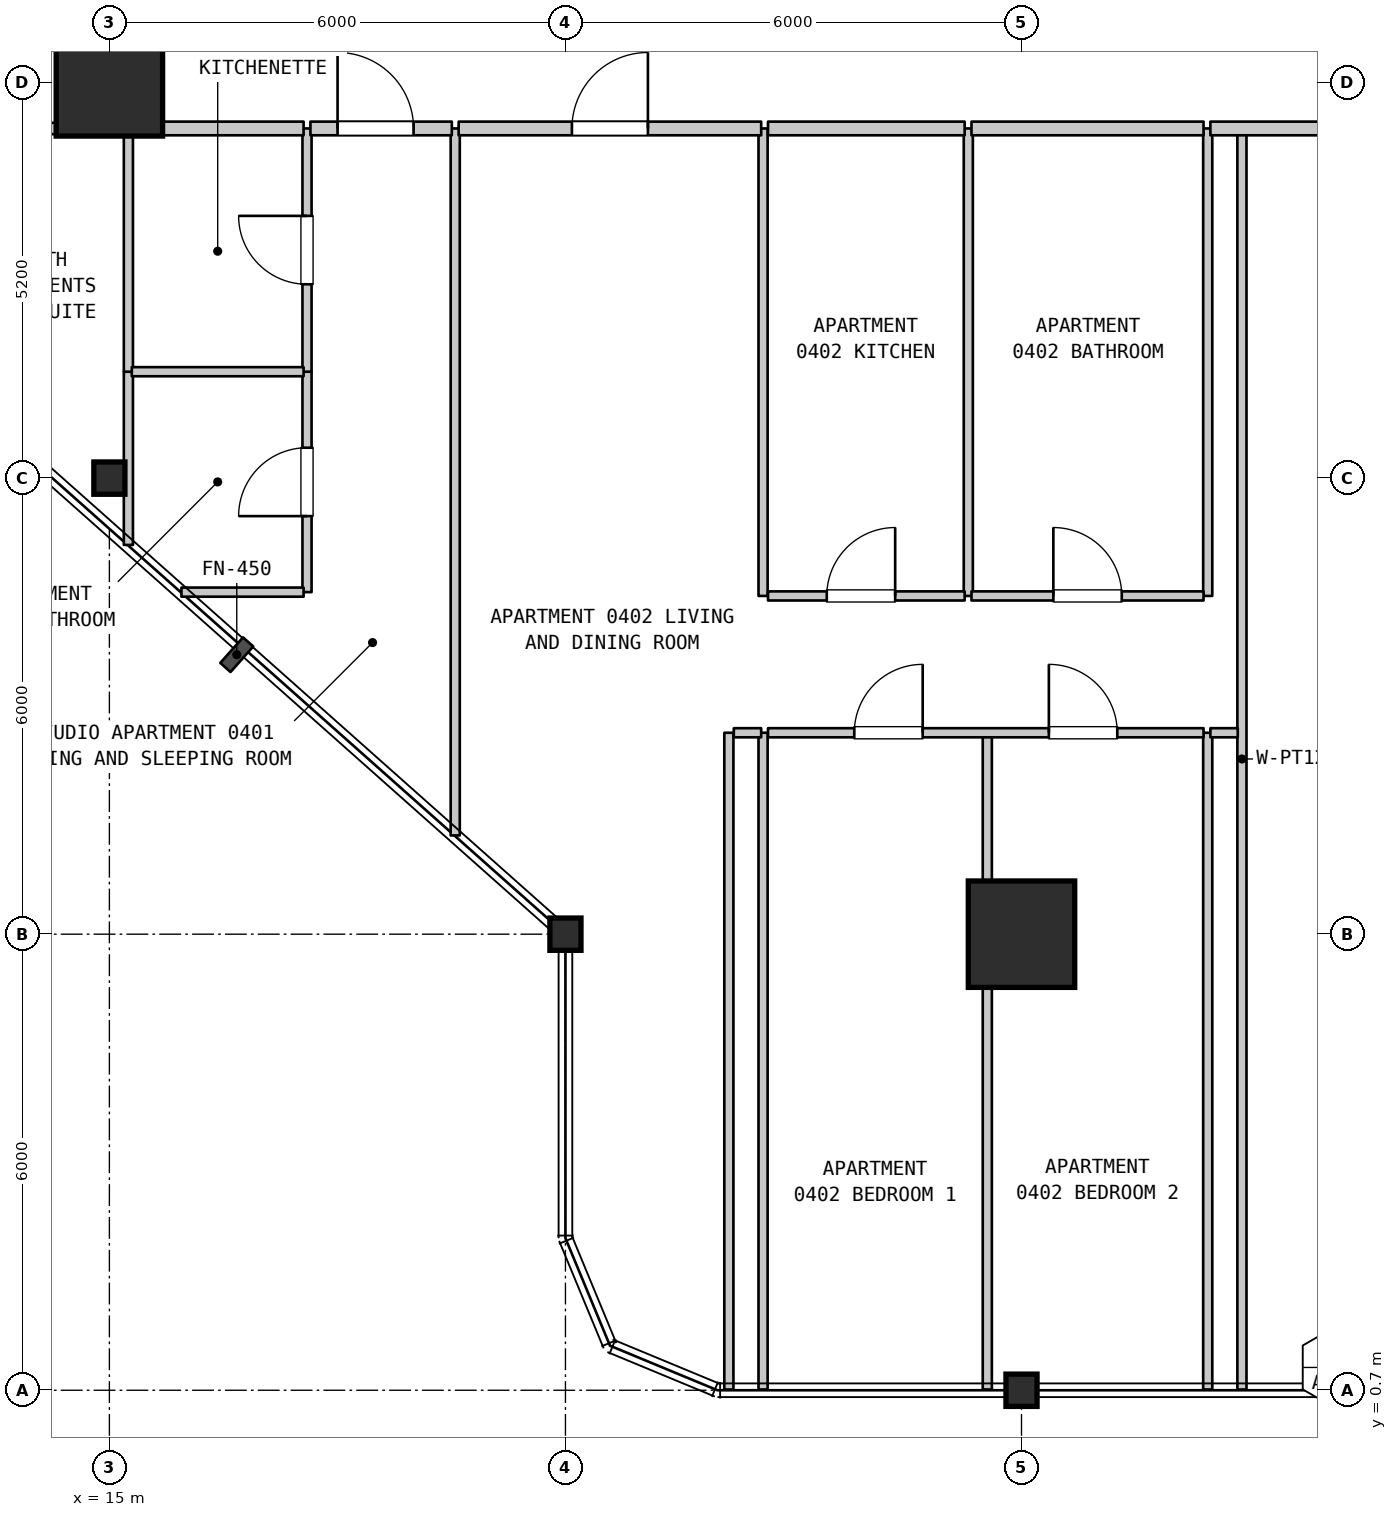
"""IFC4 building model, lengths in metres.
Left out: names, types, materials, properties, quantities, classifications, styles, units other than length and angle.
Written with IfcOpenShell. Run it as: python <this file> out.ifc"""

import sys

from ifc_helpers import new_model, si_unit, direction, frame, frame_2d, origin, origin_2d, place, context, subcontext, project, spatial, rectangle, i_section, extrude, element, fill, save


model = new_model("IFC4")
c1 = context("Model", 3, precision=1e-05, world=origin(), true_north=direction((0.0, 1.0)))
c2 = subcontext(c1, "Body", "Model", "MODEL_VIEW")
j1 = project(units=[si_unit("LENGTHUNIT", "METRE"), si_unit("PLANEANGLEUNIT", "RADIAN")], contexts=[c1])
p1 = place(None, origin())
s1 = spatial("IfcSite", under=j1, at=p1, CompositionType="ELEMENT")
p2 = place(p1, origin())
s2 = spatial("IfcBuilding", under=s1, at=p2, CompositionType="ELEMENT")
p3 = place(p2, frame((0.0, 0.0, 24.0)))
s3 = spatial("IfcBuildingStorey", under=s2, at=p3, CompositionType="ELEMENT", Elevation=24.0)
p4 = place(p3, frame((15.0, 12.7, 0.0), z_axis=(0.0, 0.0, 1.0), x_axis=(1.0, 0.0, 0.0)))
e1 = element("IfcColumn", 1, at=p4, inside=s3, PredefinedType="COLUMN", context=c2, shape_type="SweptSolid", body=[
    extrude(i_section(OverallWidth=0.409, OverallDepth=0.425, WebThickness=0.032, FlangeThickness=0.052, FilletRadius=0.015, at=origin_2d()), origin(), (0.0, 0.0, 1.0), 3.7),
])
p5 = place(p3, frame((15.0, 17.9, 0.0), z_axis=(0.0, 0.0, 1.0), x_axis=(1.0, 0.0, 0.0)))
e2 = element("IfcColumn", 2, at=p5, inside=s3, PredefinedType="COLUMN", context=c2, shape_type="SweptSolid", body=[
    extrude(rectangle(XDim=1.4, YDim=1.4, at=origin_2d()), origin(), (0.0, 0.0, 1.0), 3.7),
])
for number, where, z_axis, x_axis in (
    (3, (21.0, 6.7, 0.0), (0.0, 0.0, 1.0), (1.0, 0.0, 0.0)),
    (4, (27.0, 0.7, 0.0), (0.0, 0.0, 1.0), (1.0, 0.0, 0.0)),
):
    element("IfcColumn", number, at=place(p3, frame(where, z_axis=z_axis, x_axis=x_axis)), inside=s3, PredefinedType="COLUMN", context=c2, shape_type="SweptSolid", body=[
        extrude(i_section(OverallWidth=0.409, OverallDepth=0.425, WebThickness=0.032, FlangeThickness=0.052, FilletRadius=0.015, at=origin_2d()), origin(), (0.0, 0.0, 1.0), 3.7),
    ])
p6 = place(p3, frame((27.0, 6.7, 0.0), z_axis=(0.0, 0.0, 1.0), x_axis=(1.0, 0.0, 0.0)))
e5 = element("IfcColumn", 5, at=p6, inside=s3, PredefinedType="COLUMN", context=c2, shape_type="SweptSolid", body=[
    extrude(rectangle(XDim=1.4, YDim=1.4, at=origin_2d()), origin(), (0.0, 0.0, 1.0), 3.7),
])
p7 = place(p3, frame((15.25, 11.821, 0.0), z_axis=(0.0, 0.0, 1.0), x_axis=(0.0, 1.0, 0.0)))
e6 = element("IfcWall", 6, at=p7, inside=s3, PredefinedType="PARTITIONING", context=c2, shape_type="SweptSolid", body=[
    extrude(rectangle(XDim=2.279, YDim=0.12, at=frame_2d((1.14, 0.0))), origin(), (0.0, 0.0, 1.0), 3.385),
])
p8 = place(p3, frame((15.25, 14.1, 0.0), z_axis=(0.0, 0.0, 1.0), x_axis=(0.0, 1.0, 0.0)))
e7 = element("IfcWall", 7, at=p8, inside=s3, PredefinedType="PARTITIONING", context=c2, shape_type="SweptSolid", body=[
    extrude(rectangle(XDim=3.2, YDim=0.12, at=frame_2d((1.6, 0.0))), origin(), (0.0, 0.0, 1.0), 3.385),
])
p9 = place(p3, frame((17.6, 11.2, 0.0), z_axis=(0.0, 0.0, 1.0), x_axis=(0.0, 1.0, 0.0)))
e8 = element("IfcWall", 8, at=p9, inside=s3, PredefinedType="PARTITIONING", context=c2, shape_type="SweptSolid", body=[
    extrude(rectangle(XDim=2.9, YDim=0.12, at=frame_2d((1.45, 0.0))), origin(), (0.0, 0.0, 1.0), 3.385),
])
p10 = place(p9, frame((1.0, 0.0, 0.0)))
e9 = element("IfcOpeningElement", 9, at=p10, cuts=e8, PredefinedType="OPENING", context=c2, shape_type="SweptSolid", body=[
    extrude(rectangle(XDim=0.9, YDim=2.1, at=frame_2d((0.45, 1.05))), frame((0.0, 0.07, 0.0), z_axis=(0.0, -1.0, 0.0), x_axis=(1.0, 0.0, 0.0)), (0.0, 0.0, 1.0), 0.14),
])
p11 = place(p3, frame((17.6, 14.1, 0.0), z_axis=(0.0, 0.0, 1.0), x_axis=(0.0, 1.0, 0.0)))
e10 = element("IfcWall", 10, at=p11, inside=s3, PredefinedType="PARTITIONING", context=c2, shape_type="SweptSolid", body=[
    extrude(rectangle(XDim=3.2, YDim=0.12, at=frame_2d((1.6, 0.0))), origin(), (0.0, 0.0, 1.0), 3.385),
])
p12 = place(p11, frame((1.15, 0.0, 0.0)))
e11 = element("IfcOpeningElement", 11, at=p12, cuts=e10, PredefinedType="OPENING", context=c2, shape_type="SweptSolid", body=[
    extrude(rectangle(XDim=0.9, YDim=2.15, at=frame_2d((0.45, 1.075))), frame((0.0, 0.07, 0.0), z_axis=(0.0, -1.0, 0.0), x_axis=(1.0, 0.0, 0.0)), (0.0, 0.0, 1.0), 0.14),
])
p13 = place(p3, frame((19.55, 7.999, 0.0), z_axis=(0.0, 0.0, 1.0), x_axis=(0.0, 1.0, 0.0)))
e12 = element("IfcWall", 12, at=p13, inside=s3, PredefinedType="PARTITIONING", context=c2, shape_type="SweptSolid", body=[
    extrude(rectangle(XDim=9.301, YDim=0.12, at=frame_2d((4.65, 0.0))), origin(), (0.0, 0.0, 1.0), 3.385),
])
for number, where, z_axis, x_axis in (
    (13, (23.15, 0.71, 0.0), (0.0, 0.0, 1.0), (0.0, 1.0, 0.0)),
    (14, (23.6, 0.71, 0.0), (0.0, 0.0, 1.0), (0.0, 1.0, 0.0)),
):
    element("IfcWall", number, at=place(p3, frame(where, z_axis=z_axis, x_axis=x_axis)), inside=s3, PredefinedType="PARTITIONING", context=c2, shape_type="SweptSolid", body=[
        extrude(rectangle(XDim=8.64, YDim=0.12, at=frame_2d((4.32, 0.0))), origin(), (0.0, 0.0, 1.0), 3.385),
    ])
for number, where, z_axis, x_axis in (
    (15, (23.6, 11.15, 0.0), (0.0, 0.0, 1.0), (0.0, 1.0, 0.0)),
    (16, (26.3, 11.15, 0.0), (0.0, 0.0, 1.0), (0.0, 1.0, 0.0)),
):
    element("IfcWall", number, at=place(p3, frame(where, z_axis=z_axis, x_axis=x_axis)), inside=s3, PredefinedType="PARTITIONING", context=c2, shape_type="SweptSolid", body=[
        extrude(rectangle(XDim=6.15, YDim=0.12, at=frame_2d((3.075, 0.0))), origin(), (0.0, 0.0, 1.0), 3.385),
    ])
for number, where, z_axis, x_axis in (
    (17, (26.55, 0.71, 0.0), (0.0, 0.0, 1.0), (0.0, 1.0, 0.0)),
    (18, (29.45, 0.71, 0.0), (0.0, 0.0, 1.0), (0.0, 1.0, 0.0)),
):
    element("IfcWall", number, at=place(p3, frame(where, z_axis=z_axis, x_axis=x_axis)), inside=s3, PredefinedType="PARTITIONING", context=c2, shape_type="SweptSolid", body=[
        extrude(rectangle(XDim=8.64, YDim=0.12, at=frame_2d((4.32, 0.0))), origin(), (0.0, 0.0, 1.0), 3.385),
    ])
p14 = place(p3, frame((29.45, 11.15, 0.0), z_axis=(0.0, 0.0, 1.0), x_axis=(0.0, 1.0, 0.0)))
e19 = element("IfcWall", 19, at=p14, inside=s3, PredefinedType="PARTITIONING", context=c2, shape_type="SweptSolid", body=[
    extrude(rectangle(XDim=6.15, YDim=0.12, at=frame_2d((3.075, 0.0))), origin(), (0.0, 0.0, 1.0), 3.385),
])
p15 = place(p3, frame((29.9, 0.71, 0.0), z_axis=(0.0, 0.0, 1.0), x_axis=(0.0, 1.0, 0.0)))
e20 = element("IfcWall", 20, at=p15, inside=s3, PredefinedType="PARTITIONING", context=c2, shape_type="SweptSolid", body=[
    extrude(rectangle(XDim=16.59, YDim=0.12, at=frame_2d((8.295, 0.0))), origin(), (0.0, 0.0, 1.0), 3.385),
])
p16 = place(p3, frame((23.215, 9.35, 0.0), z_axis=(0.0, 0.0, 1.0), x_axis=(1.0, 0.0, 0.0)))
e21 = element("IfcWall", 21, at=p16, inside=s3, PredefinedType="PARTITIONING", context=c2, shape_type="SweptSolid", body=[
    extrude(rectangle(XDim=0.36, YDim=0.12, at=frame_2d((0.18, 0.0))), origin(), (0.0, 0.0, 1.0), 3.385),
])
p17 = place(p3, frame((23.665, 9.35, 0.0), z_axis=(0.0, 0.0, 1.0), x_axis=(1.0, 0.0, 0.0)))
e22 = element("IfcWall", 22, at=p17, inside=s3, PredefinedType="PARTITIONING", context=c2, shape_type="SweptSolid", body=[
    extrude(rectangle(XDim=5.73, YDim=0.12, at=frame_2d((2.865, 0.0))), origin(), (0.0, 0.0, 1.0), 3.385),
])
p18 = place(p17, frame((1.135, 0.0, 0.0)))
e23 = element("IfcOpeningElement", 23, at=p18, cuts=e22, PredefinedType="OPENING", context=c2, shape_type="SweptSolid", body=[
    extrude(rectangle(XDim=0.9, YDim=2.15, at=frame_2d((0.45, 1.075))), frame((0.0, 0.07, 0.0), z_axis=(0.0, -1.0, 0.0), x_axis=(1.0, 0.0, 0.0)), (0.0, 0.0, 1.0), 0.14),
])
p19 = place(p17, frame((3.695, 0.0, 0.0)))
e24 = element("IfcOpeningElement", 24, at=p19, cuts=e22, PredefinedType="OPENING", context=c2, shape_type="SweptSolid", body=[
    extrude(rectangle(XDim=0.9, YDim=2.15, at=frame_2d((0.45, 1.075))), frame((0.0, 0.07, 0.0), z_axis=(0.0, -1.0, 0.0), x_axis=(1.0, 0.0, 0.0)), (0.0, 0.0, 1.0), 0.14),
])
p20 = place(p3, frame((29.485, 9.35, 0.0), z_axis=(0.0, 0.0, 1.0), x_axis=(1.0, 0.0, 0.0)))
e25 = element("IfcWall", 25, at=p20, inside=s3, PredefinedType="PARTITIONING", context=c2, shape_type="SweptSolid", body=[
    extrude(rectangle(XDim=0.36, YDim=0.12, at=frame_2d((0.18, 0.0))), origin(), (0.0, 0.0, 1.0), 3.385),
])
p21 = place(p3, frame((23.665, 11.15, 0.0), z_axis=(0.0, 0.0, 1.0), x_axis=(1.0, 0.0, 0.0)))
e26 = element("IfcWall", 26, at=p21, inside=s3, PredefinedType="PARTITIONING", context=c2, shape_type="SweptSolid", body=[
    extrude(rectangle(XDim=2.587, YDim=0.12, at=frame_2d((1.293, 0.0))), origin(), (0.0, 0.0, 1.0), 3.385),
])
p22 = place(p21, frame((0.773, 0.0, 0.0)))
e27 = element("IfcOpeningElement", 27, at=p22, cuts=e26, PredefinedType="OPENING", context=c2, shape_type="SweptSolid", body=[
    extrude(rectangle(XDim=0.9, YDim=2.15, at=frame_2d((0.45, 1.075))), frame((0.0, 0.07, 0.0), z_axis=(0.0, -1.0, 0.0), x_axis=(1.0, 0.0, 0.0)), (0.0, 0.0, 1.0), 0.14),
])
p23 = place(p3, frame((26.342, 11.15, 0.0), z_axis=(0.0, 0.0, 1.0), x_axis=(1.0, 0.0, 0.0)))
e28 = element("IfcWall", 28, at=p23, inside=s3, PredefinedType="PARTITIONING", context=c2, shape_type="SweptSolid", body=[
    extrude(rectangle(XDim=3.053, YDim=0.12, at=frame_2d((1.526, 0.0))), origin(), (0.0, 0.0, 1.0), 3.385),
])
p24 = place(p23, frame((1.077, 0.0, 0.0)))
e29 = element("IfcOpeningElement", 29, at=p24, cuts=e28, PredefinedType="OPENING", context=c2, shape_type="SweptSolid", body=[
    extrude(rectangle(XDim=0.9, YDim=2.1, at=frame_2d((0.45, 1.05))), frame((0.0, 0.07, 0.0), z_axis=(0.0, -1.0, 0.0), x_axis=(1.0, 0.0, 0.0)), (0.0, 0.0, 1.0), 0.14),
])
p25 = place(p3, frame((15.948, 11.2, 0.0), z_axis=(0.0, 0.0, 1.0), x_axis=(1.0, 0.0, 0.0)))
e30 = element("IfcWall", 30, at=p25, inside=s3, PredefinedType="PARTITIONING", context=c2, shape_type="SweptSolid", body=[
    extrude(rectangle(XDim=1.607, YDim=0.12, at=frame_2d((0.803, 0.0))), origin(), (0.0, 0.0, 1.0), 3.385),
])
p26 = place(p3, frame((15.295, 14.1, 0.0), z_axis=(0.0, 0.0, 1.0), x_axis=(1.0, 0.0, 0.0)))
e31 = element("IfcWall", 31, at=p26, inside=s3, PredefinedType="PARTITIONING", context=c2, shape_type="SweptSolid", body=[
    extrude(rectangle(XDim=2.26, YDim=0.12, at=frame_2d((1.13, 0.0))), origin(), (0.0, 0.0, 1.0), 3.385),
])
p27 = place(p3, frame((12.875, 17.3, 0.0), z_axis=(0.0, 0.0, 1.0), x_axis=(1.0, 0.0, 0.0)))
e32 = element("IfcWall", 32, at=p27, inside=s3, PredefinedType="STANDARD", context=c2, shape_type="SweptSolid", body=[
    extrude(rectangle(XDim=2.33, YDim=0.15, at=frame_2d((1.165, 0.0))), origin(), (0.0, 0.0, 1.0), 3.385),
])
p28 = place(p27, frame((0.315, 0.0, 0.0)))
e33 = element("IfcOpeningElement", 33, at=p28, cuts=e32, PredefinedType="OPENING", context=c2, shape_type="SweptSolid", body=[
    extrude(rectangle(XDim=1.0, YDim=2.15, at=frame_2d((0.5, 1.075))), frame((0.0, 0.085, 0.0), z_axis=(0.0, -1.0, 0.0), x_axis=(1.0, 0.0, 0.0)), (0.0, 0.0, 1.0), 0.17),
])
p29 = place(p3, frame((15.295, 17.3, 0.0), z_axis=(0.0, 0.0, 1.0), x_axis=(1.0, 0.0, 0.0)))
e34 = element("IfcWall", 34, at=p29, inside=s3, PredefinedType="STANDARD", context=c2, shape_type="SweptSolid", body=[
    extrude(rectangle(XDim=2.26, YDim=0.18, at=frame_2d((1.13, 0.0))), origin(), (0.0, 0.0, 1.0), 3.385),
])
p30 = place(p3, frame((17.645, 17.3, 0.0), z_axis=(0.0, 0.0, 1.0), x_axis=(1.0, 0.0, 0.0)))
e35 = element("IfcWall", 35, at=p30, inside=s3, PredefinedType="STANDARD", context=c2, shape_type="SweptSolid", body=[
    extrude(rectangle(XDim=1.86, YDim=0.18, at=frame_2d((0.93, 0.0))), origin(), (0.0, 0.0, 1.0), 3.385),
])
p31 = place(p30, frame((0.357, 0.0, 0.0)))
e36 = element("IfcOpeningElement", 36, at=p31, cuts=e35, PredefinedType="OPENING", context=c2, shape_type="SweptSolid", body=[
    extrude(rectangle(XDim=1.0, YDim=2.15, at=frame_2d((0.5, 1.075))), frame((0.0, 0.1, 0.0), z_axis=(0.0, -1.0, 0.0), x_axis=(1.0, 0.0, 0.0)), (0.0, 0.0, 1.0), 0.2),
])
p32 = place(p3, frame((19.595, 17.3, 0.0), z_axis=(0.0, 0.0, 1.0), x_axis=(1.0, 0.0, 0.0)))
e37 = element("IfcWall", 37, at=p32, inside=s3, PredefinedType="STANDARD", context=c2, shape_type="SweptSolid", body=[
    extrude(rectangle(XDim=3.98, YDim=0.18, at=frame_2d((1.99, 0.0))), origin(), (0.0, 0.0, 1.0), 3.385),
])
p33 = place(p32, frame((1.49, 0.0, 0.0)))
e38 = element("IfcOpeningElement", 38, at=p33, cuts=e37, PredefinedType="OPENING", context=c2, shape_type="SweptSolid", body=[
    extrude(rectangle(XDim=1.0, YDim=2.15, at=frame_2d((0.5, 1.075))), frame((0.0, 0.1, 0.0), z_axis=(0.0, -1.0, 0.0), x_axis=(1.0, 0.0, 0.0)), (0.0, 0.0, 1.0), 0.2),
])
p34 = place(p3, frame((23.665, 17.3, 0.0), z_axis=(0.0, 0.0, 1.0), x_axis=(1.0, 0.0, 0.0)))
e39 = element("IfcWall", 39, at=p34, inside=s3, PredefinedType="STANDARD", context=c2, shape_type="SweptSolid", body=[
    extrude(rectangle(XDim=2.587, YDim=0.18, at=frame_2d((1.293, 0.0))), origin(), (0.0, 0.0, 1.0), 3.385),
])
p35 = place(p3, frame((26.342, 17.3, 0.0), z_axis=(0.0, 0.0, 1.0), x_axis=(1.0, 0.0, 0.0)))
e40 = element("IfcWall", 40, at=p35, inside=s3, PredefinedType="STANDARD", context=c2, shape_type="SweptSolid", body=[
    extrude(rectangle(XDim=3.053, YDim=0.18, at=frame_2d((1.526, 0.0))), origin(), (0.0, 0.0, 1.0), 3.385),
])
p36 = place(p3, frame((29.485, 17.3, 0.0), z_axis=(0.0, 0.0, 1.0), x_axis=(1.0, 0.0, 0.0)))
e41 = element("IfcWall", 41, at=p36, inside=s3, PredefinedType="STANDARD", context=c2, shape_type="SweptSolid", body=[
    extrude(rectangle(XDim=4.41, YDim=0.18, at=frame_2d((2.205, 0.0))), origin(), (0.0, 0.0, 1.0), 3.385),
])
p37 = place(p36, frame((1.617, 0.0, 0.0)))
e42 = element("IfcOpeningElement", 42, at=p37, cuts=e41, PredefinedType="OPENING", context=c2, shape_type="SweptSolid", body=[
    extrude(rectangle(XDim=1.0, YDim=2.15, at=frame_2d((0.5, 1.075))), frame((0.0, 0.1, 0.0), z_axis=(0.0, -1.0, 0.0), x_axis=(1.0, 0.0, 0.0)), (0.0, 0.0, 1.0), 0.2),
])
p38 = place(p10, origin())
e43 = element("IfcDoor", 43, at=p38, inside=s3, OperationType="SINGLE_SWING_LEFT", PredefinedType="DOOR", context=c2, shape_type="SweptSolid", body=[
    extrude(rectangle(XDim=0.9, YDim=2.1, at=frame_2d((0.45, 1.05))), frame((0.0, 0.025, 0.0), z_axis=(0.0, -1.0, 0.0), x_axis=(1.0, 0.0, 0.0)), (0.0, 0.0, 1.0), 0.05),
])
fill(e9, e43)
p39 = place(p12, origin())
e44 = element("IfcDoor", 44, at=p39, inside=s3, OperationType="SINGLE_SWING_RIGHT", PredefinedType="DOOR", context=c2, shape_type="SweptSolid", body=[
    extrude(rectangle(XDim=0.9, YDim=2.15, at=frame_2d((0.45, 1.075))), frame((0.0, 0.025, 0.0), z_axis=(0.0, -1.0, 0.0), x_axis=(1.0, 0.0, 0.0)), (0.0, 0.0, 1.0), 0.05),
])
fill(e11, e44)
p40 = place(p18, origin())
e45 = element("IfcDoor", 45, at=p40, inside=s3, OperationType="SINGLE_SWING_RIGHT", PredefinedType="DOOR", context=c2, shape_type="SweptSolid", body=[
    extrude(rectangle(XDim=0.9, YDim=2.15, at=frame_2d((0.45, 1.075))), frame((0.0, 0.025, 0.0), z_axis=(0.0, -1.0, 0.0), x_axis=(1.0, 0.0, 0.0)), (0.0, 0.0, 1.0), 0.05),
])
fill(e23, e45)
p41 = place(p19, origin())
e46 = element("IfcDoor", 46, at=p41, inside=s3, OperationType="SINGLE_SWING_LEFT", PredefinedType="DOOR", context=c2, shape_type="SweptSolid", body=[
    extrude(rectangle(XDim=0.9, YDim=2.15, at=frame_2d((0.45, 1.075))), frame((0.0, 0.025, 0.0), z_axis=(0.0, -1.0, 0.0), x_axis=(1.0, 0.0, 0.0)), (0.0, 0.0, 1.0), 0.05),
])
fill(e24, e46)
p42 = place(p22, origin())
e47 = element("IfcDoor", 47, at=p42, inside=s3, OperationType="SINGLE_SWING_RIGHT", PredefinedType="DOOR", context=c2, shape_type="SweptSolid", body=[
    extrude(rectangle(XDim=0.9, YDim=2.15, at=frame_2d((0.45, 1.075))), frame((0.0, 0.025, 0.0), z_axis=(0.0, -1.0, 0.0), x_axis=(1.0, 0.0, 0.0)), (0.0, 0.0, 1.0), 0.05),
])
fill(e27, e47)
p43 = place(p24, origin())
e48 = element("IfcDoor", 48, at=p43, inside=s3, OperationType="SINGLE_SWING_LEFT", PredefinedType="DOOR", context=c2, shape_type="SweptSolid", body=[
    extrude(rectangle(XDim=0.9, YDim=2.1, at=frame_2d((0.45, 1.05))), frame((0.0, 0.025, 0.0), z_axis=(0.0, -1.0, 0.0), x_axis=(1.0, 0.0, 0.0)), (0.0, 0.0, 1.0), 0.05),
])
fill(e29, e48)
p44 = place(p31, origin())
e49 = element("IfcDoor", 49, at=p44, inside=s3, OperationType="SINGLE_SWING_LEFT", PredefinedType="DOOR", context=c2, shape_type="SweptSolid", body=[
    extrude(rectangle(XDim=1.0, YDim=2.15, at=frame_2d((0.5, 1.075))), frame((0.0, 0.025, 0.0), z_axis=(0.0, -1.0, 0.0), x_axis=(1.0, 0.0, 0.0)), (0.0, 0.0, 1.0), 0.05),
])
fill(e36, e49)
p45 = place(p33, origin())
e50 = element("IfcDoor", 50, at=p45, inside=s3, OperationType="SINGLE_SWING_RIGHT", PredefinedType="DOOR", context=c2, shape_type="SweptSolid", body=[
    extrude(rectangle(XDim=1.0, YDim=2.15, at=frame_2d((0.5, 1.075))), frame((0.0, 0.025, 0.0), z_axis=(0.0, -1.0, 0.0), x_axis=(1.0, 0.0, 0.0)), (0.0, 0.0, 1.0), 0.05),
])
fill(e38, e50)
save(model, sys.argv[1])
